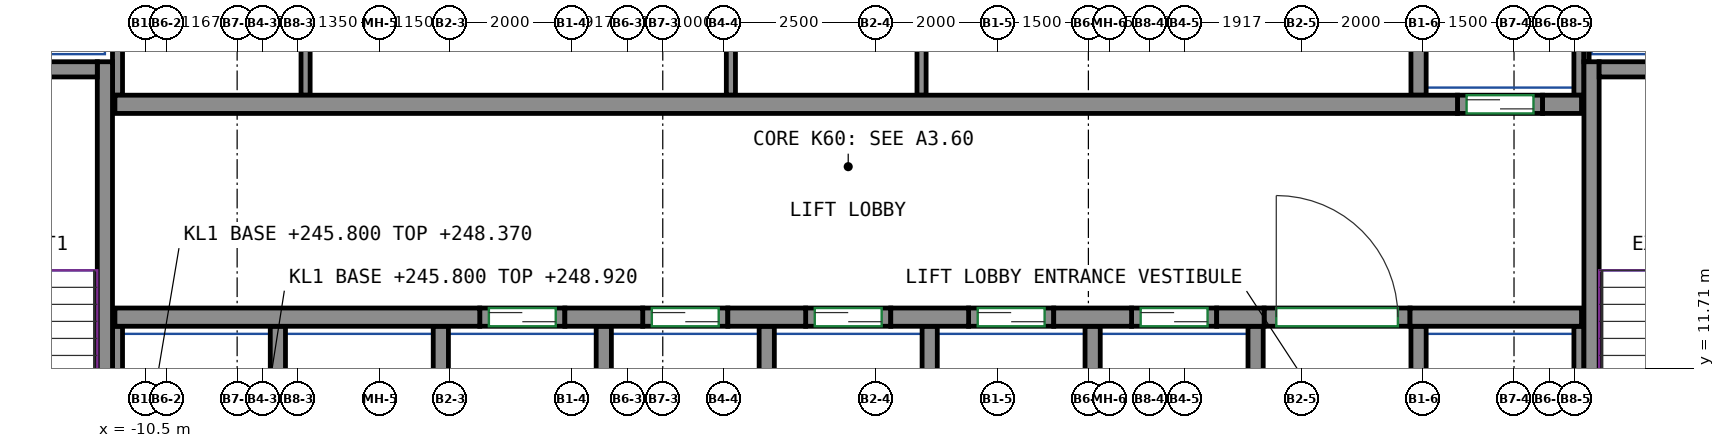
"""IFC4 building model, lengths in metres.
Left out: names, types, materials, properties, quantities, classifications, styles, units other than length and angle.
Written with IfcOpenShell. Run it as: python <this file> out.ifc"""

import sys

from ifc_helpers import new_model, si_unit, direction, frame, frame_2d, origin, place, context, subcontext, project, spatial, rectangle, extrude, source, transform, mapped, element, fill, save


model = new_model("IFC4")
c1 = context("Model", 3, precision=1e-05, world=origin(), true_north=direction((0.0, 1.0)))
c2 = subcontext(c1, "Body", "Model", "MODEL_VIEW")
j1 = project(units=[si_unit("LENGTHUNIT", "METRE"), si_unit("PLANEANGLEUNIT", "RADIAN")], contexts=[c1])
p1 = place(None, origin())
s1 = spatial("IfcSite", under=j1, at=p1, CompositionType="ELEMENT")
p2 = place(p1, origin())
s2 = spatial("IfcBuilding", under=s1, at=p2, CompositionType="ELEMENT")
p3 = place(p2, frame((0.0, 0.0, 245.8)))
s3 = spatial("IfcBuildingStorey", under=s2, at=p3, CompositionType="ELEMENT", Elevation=245.8)
m1 = source(origin(), c2, "Body", "SweptSolid", [
    extrude(rectangle(XDim=7.75, YDim=0.25, at=frame_2d((3.875, 0.0))), origin(), (0.0, 0.0, 1.0), 3.12),
])
p4 = place(p3, frame((-11.175, 9.0, 0.0), z_axis=(0.0, 0.0, 1.0), x_axis=(0.0, 1.0, 0.0)))
e1 = element("IfcWall", 1, at=p4, inside=s3, PredefinedType="SHEAR", context=c2, shape_type="MappedRepresentation", body=[
    mapped(m1, transform((0.0, 0.0, 0.0))),
])
m2 = source(origin(), c2, "Body", "SweptSolid", [
    extrude(rectangle(XDim=3.7, YDim=0.25, at=frame_2d((1.85, 0.0))), origin(), (0.0, 0.0, 1.0), 3.12),
])
p5 = place(p3, frame((-15.0, 16.625, 0.0), z_axis=(0.0, 0.0, 1.0), x_axis=(1.0, 0.0, 0.0)))
e2 = element("IfcWall", 2, at=p5, inside=s3, PredefinedType="SHEAR", context=c2, shape_type="MappedRepresentation", body=[
    mapped(m2, transform((0.0, 0.0, 0.0))),
])
p6 = place(p3, frame((13.275, 9.0, 0.0), z_axis=(0.0, 0.0, 1.0), x_axis=(0.0, 1.0, 0.0)))
e3 = element("IfcWall", 3, at=p6, inside=s3, PredefinedType="SHEAR", context=c2, shape_type="MappedRepresentation", body=[
    mapped(m1, transform((0.0, 0.0, 0.0))),
])
m3 = source(origin(), c2, "Body", "SweptSolid", [
    extrude(rectangle(XDim=3.7, YDim=0.25, at=frame_2d((1.85, 0.0))), origin(), (0.0, 0.0, 1.0), 3.12),
])
p7 = place(p3, frame((13.4, 16.625, 0.0), z_axis=(0.0, 0.0, 1.0), x_axis=(1.0, 0.0, 0.0)))
e4 = element("IfcWall", 4, at=p7, inside=s3, PredefinedType="SHEAR", context=c2, shape_type="MappedRepresentation", body=[
    mapped(m3, transform((0.0, 0.0, 0.0))),
])
m4 = source(origin(), c2, "Body", "SweptSolid", [
    extrude(rectangle(XDim=6.0, YDim=0.3, at=frame_2d((3.0, 0.0))), origin(), (0.0, 0.0, 1.0), 3.12),
])
p8 = place(p3, frame((-11.01, 12.55, 0.0), z_axis=(0.0, 0.0, 1.0), x_axis=(1.0, 0.0, 0.0)))
e5 = element("IfcWall", 5, at=p8, inside=s3, PredefinedType="SHEAR", context=c2, shape_type="MappedRepresentation", body=[
    mapped(m4, transform((0.0, 0.0, 0.0))),
])
m5 = source(origin(), c2, "Body", "SweptSolid", [
    extrude(rectangle(XDim=1.28, YDim=0.3, at=frame_2d((0.64, 0.0))), origin(), (0.0, 0.0, 1.0), 3.12),
])
for number, where, z_axis, x_axis in (
    (6, (-3.61, 12.55, 0.0), (0.0, 0.0, 1.0), (1.0, 0.0, 0.0)),
    (7, (-0.93, 12.55, 0.0), (0.0, 0.0, 1.0), (1.0, 0.0, 0.0)),
    (8, (1.75, 12.55, 0.0), (0.0, 0.0, 1.0), (1.0, 0.0, 0.0)),
    (9, (4.43, 12.55, 0.0), (0.0, 0.0, 1.0), (1.0, 0.0, 0.0)),
):
    element("IfcWall", number, at=place(p3, frame(where, z_axis=z_axis, x_axis=x_axis)), inside=s3, PredefinedType="SHEAR", context=c2, shape_type="MappedRepresentation", body=[
        mapped(m5, transform((0.0, 0.0, 0.0))),
    ])
m6 = source(origin(), c2, "Body", "SweptSolid", [
    extrude(rectangle(XDim=0.78, YDim=0.3, at=frame_2d((0.39, 0.0))), origin(), (0.0, 0.0, 1.0), 3.12),
])
p9 = place(p3, frame((7.11, 12.55, 0.0), z_axis=(0.0, 0.0, 1.0), x_axis=(1.0, 0.0, 0.0)))
e10 = element("IfcWall", 10, at=p9, inside=s3, PredefinedType="SHEAR", context=c2, shape_type="MappedRepresentation", body=[
    mapped(m6, transform((0.0, 0.0, 0.0))),
])
m7 = source(origin(), c2, "Body", "SweptSolid", [
    extrude(rectangle(XDim=2.82, YDim=0.3, at=frame_2d((1.41, 0.0))), origin(), (0.0, 0.0, 1.0), 3.12),
])
p10 = place(p3, frame((10.29, 12.55, 0.0), z_axis=(0.0, 0.0, 1.0), x_axis=(1.0, 0.0, 0.0)))
e11 = element("IfcWall", 11, at=p10, inside=s3, PredefinedType="SHEAR", context=c2, shape_type="MappedRepresentation", body=[
    mapped(m7, transform((0.0, 0.0, 0.0))),
])
m8 = source(origin(), c2, "Body", "SweptSolid", [
    extrude(rectangle(XDim=22.08, YDim=0.3, at=frame_2d((11.04, 0.0))), origin(), (0.0, 0.0, 1.0), 3.12),
])
p11 = place(p3, frame((-11.01, 16.05, 0.0), z_axis=(0.0, 0.0, 1.0), x_axis=(1.0, 0.0, 0.0)))
e12 = element("IfcWall", 12, at=p11, inside=s3, PredefinedType="SHEAR", context=c2, shape_type="MappedRepresentation", body=[
    mapped(m8, transform((0.0, 0.0, 0.0))),
])
m9 = source(origin(), c2, "Body", "SweptSolid", [
    extrude(rectangle(XDim=0.64, YDim=0.3, at=frame_2d((0.32, 0.0))), origin(), (0.0, 0.0, 1.0), 3.12),
])
p12 = place(p3, frame((12.47, 16.05, 0.0), z_axis=(0.0, 0.0, 1.0), x_axis=(1.0, 0.0, 0.0)))
e13 = element("IfcWall", 13, at=p12, inside=s3, PredefinedType="SHEAR", context=c2, shape_type="MappedRepresentation", body=[
    mapped(m9, transform((0.0, 0.0, 0.0))),
])
m10 = source(origin(), c2, "Body", "SweptSolid", [
    extrude(rectangle(XDim=1.4, YDim=0.3, at=frame_2d((0.7, 0.0))), origin(), (0.0, 0.0, 1.0), 3.12),
])
p13 = place(p3, frame((-5.01, 12.55, 0.0), z_axis=(0.0, 0.0, 1.0), x_axis=(1.0, 0.0, 0.0)))
e14 = element("IfcWall", 14, at=p13, inside=s3, PredefinedType="PARTITIONING", context=c2, shape_type="MappedRepresentation", body=[
    mapped(m10, transform((0.0, 0.0, 0.0))),
])
p14 = place(p13, frame((0.15, 0.0, 0.0)))
e15 = element("IfcOpeningElement", 15, at=p14, cuts=e14, PredefinedType="OPENING", context=c2, shape_type="SweptSolid", body=[
    extrude(rectangle(XDim=1.1, YDim=2.1, at=frame_2d((0.55, 1.05))), frame((0.0, 0.16, 0.0), z_axis=(0.0, -1.0, 0.0), x_axis=(1.0, 0.0, 0.0)), (0.0, 0.0, 1.0), 0.32),
])
m11 = source(origin(), c2, "Body", "SweptSolid", [
    extrude(rectangle(XDim=1.4, YDim=0.3, at=frame_2d((0.7, 0.0))), origin(), (0.0, 0.0, 1.0), 3.12),
])
p15 = place(p3, frame((-2.33, 12.55, 0.0), z_axis=(0.0, 0.0, 1.0), x_axis=(1.0, 0.0, 0.0)))
e16 = element("IfcWall", 16, at=p15, inside=s3, PredefinedType="PARTITIONING", context=c2, shape_type="MappedRepresentation", body=[
    mapped(m11, transform((0.0, 0.0, 0.0))),
])
p16 = place(p15, frame((0.15, 0.0, 0.0)))
e17 = element("IfcOpeningElement", 17, at=p16, cuts=e16, PredefinedType="OPENING", context=c2, shape_type="SweptSolid", body=[
    extrude(rectangle(XDim=1.1, YDim=2.1, at=frame_2d((0.55, 1.05))), frame((0.0, 0.16, 0.0), z_axis=(0.0, -1.0, 0.0), x_axis=(1.0, 0.0, 0.0)), (0.0, 0.0, 1.0), 0.32),
])
p17 = place(p3, frame((0.35, 12.55, 0.0), z_axis=(0.0, 0.0, 1.0), x_axis=(1.0, 0.0, 0.0)))
e18 = element("IfcWall", 18, at=p17, inside=s3, PredefinedType="PARTITIONING", context=c2, shape_type="MappedRepresentation", body=[
    mapped(m10, transform((0.0, 0.0, 0.0))),
])
p18 = place(p17, frame((0.15, 0.0, 0.0)))
e19 = element("IfcOpeningElement", 19, at=p18, cuts=e18, PredefinedType="OPENING", context=c2, shape_type="SweptSolid", body=[
    extrude(rectangle(XDim=1.1, YDim=2.1, at=frame_2d((0.55, 1.05))), frame((0.0, 0.16, 0.0), z_axis=(0.0, -1.0, 0.0), x_axis=(1.0, 0.0, 0.0)), (0.0, 0.0, 1.0), 0.32),
])
p19 = place(p3, frame((3.03, 12.55, 0.0), z_axis=(0.0, 0.0, 1.0), x_axis=(1.0, 0.0, 0.0)))
e20 = element("IfcWall", 20, at=p19, inside=s3, PredefinedType="PARTITIONING", context=c2, shape_type="MappedRepresentation", body=[
    mapped(m10, transform((0.0, 0.0, 0.0))),
])
p20 = place(p19, frame((0.15, 0.0, 0.0)))
e21 = element("IfcOpeningElement", 21, at=p20, cuts=e20, PredefinedType="OPENING", context=c2, shape_type="SweptSolid", body=[
    extrude(rectangle(XDim=1.1, YDim=2.1, at=frame_2d((0.55, 1.05))), frame((0.0, 0.16, 0.0), z_axis=(0.0, -1.0, 0.0), x_axis=(1.0, 0.0, 0.0)), (0.0, 0.0, 1.0), 0.32),
])
p21 = place(p3, frame((5.71, 12.55, 0.0), z_axis=(0.0, 0.0, 1.0), x_axis=(1.0, 0.0, 0.0)))
e22 = element("IfcWall", 22, at=p21, inside=s3, PredefinedType="PARTITIONING", context=c2, shape_type="MappedRepresentation", body=[
    mapped(m11, transform((0.0, 0.0, 0.0))),
])
p22 = place(p21, frame((0.15, 0.0, 0.0)))
e23 = element("IfcOpeningElement", 23, at=p22, cuts=e22, PredefinedType="OPENING", context=c2, shape_type="SweptSolid", body=[
    extrude(rectangle(XDim=1.1, YDim=2.1, at=frame_2d((0.55, 1.05))), frame((0.0, 0.16, 0.0), z_axis=(0.0, -1.0, 0.0), x_axis=(1.0, 0.0, 0.0)), (0.0, 0.0, 1.0), 0.32),
])
p23 = place(p3, frame((11.07, 16.05, 0.0), z_axis=(0.0, 0.0, 1.0), x_axis=(1.0, 0.0, 0.0)))
e24 = element("IfcWall", 24, at=p23, inside=s3, PredefinedType="PARTITIONING", context=c2, shape_type="MappedRepresentation", body=[
    mapped(m10, transform((0.0, 0.0, 0.0))),
])
p24 = place(p23, frame((0.15, 0.0, 0.0)))
e25 = element("IfcOpeningElement", 25, at=p24, cuts=e24, PredefinedType="OPENING", context=c2, shape_type="SweptSolid", body=[
    extrude(rectangle(XDim=1.1, YDim=2.1, at=frame_2d((0.55, 1.05))), frame((0.0, 0.16, 0.0), z_axis=(0.0, -1.0, 0.0), x_axis=(1.0, 0.0, 0.0)), (0.0, 0.0, 1.0), 0.32),
])
m12 = source(origin(), c2, "Body", "SweptSolid", [
    extrude(rectangle(XDim=2.4, YDim=0.3, at=frame_2d((1.2, 0.0))), origin(), (0.0, 0.0, 1.0), 3.12),
])
p25 = place(p3, frame((7.89, 12.55, 0.0), z_axis=(0.0, 0.0, 1.0), x_axis=(1.0, 0.0, 0.0)))
e26 = element("IfcWall", 26, at=p25, inside=s3, PredefinedType="PARTITIONING", context=c2, shape_type="MappedRepresentation", body=[
    mapped(m12, transform((0.0, 0.0, 0.0))),
])
p26 = place(p25, frame((0.2, 0.0, 0.0)))
e27 = element("IfcOpeningElement", 27, at=p26, cuts=e26, PredefinedType="OPENING", context=c2, shape_type="SweptSolid", body=[
    extrude(rectangle(XDim=2.0, YDim=2.1, at=frame_2d((1.0, 1.05))), frame((0.0, 0.16, 0.0), z_axis=(0.0, -1.0, 0.0), x_axis=(1.0, 0.0, 0.0)), (0.0, 0.0, 1.0), 0.32),
])
m13 = source(origin(), c2, "Body", "SweptSolid", [
    extrude(rectangle(XDim=3.275, YDim=0.165, at=frame_2d((1.638, 0.0))), origin(), (0.0, 0.0, 1.0), 3.12),
])
p27 = place(p3, frame((13.067, 16.2, 0.0), z_axis=(0.0, 0.0, 1.0), x_axis=(0.0, 1.0, 0.0)))
e28 = element("IfcWall", 28, at=p27, inside=s3, PredefinedType="PARTITIONING", context=c2, shape_type="MappedRepresentation", body=[
    mapped(m13, transform((0.0, 0.0, 0.0))),
])
m14 = source(origin(), c2, "Body", "SweptSolid", [
    extrude(rectangle(XDim=4.8, YDim=0.165, at=frame_2d((2.4, 0.0))), origin(), (0.0, 0.0, 1.0), 3.12),
])
p28 = place(p3, frame((-10.968, 16.2, 0.0), z_axis=(0.0, 0.0, 1.0), x_axis=(0.0, 1.0, 0.0)))
e29 = element("IfcWall", 29, at=p28, inside=s3, PredefinedType="PARTITIONING", context=c2, shape_type="MappedRepresentation", body=[
    mapped(m14, transform((0.0, 0.0, 0.0))),
])
m15 = source(origin(), c2, "Body", "SweptSolid", [
    extrude(rectangle(XDim=3.275, YDim=0.25, at=frame_2d((1.638, 0.0))), origin(), (0.0, 0.0, 1.0), 3.12),
])
p29 = place(p3, frame((10.43, 16.2, 0.0), z_axis=(0.0, 0.0, 1.0), x_axis=(0.0, 1.0, 0.0)))
e30 = element("IfcWall", 30, at=p29, inside=s3, PredefinedType="PARTITIONING", context=c2, shape_type="MappedRepresentation", body=[
    mapped(m15, transform((0.0, 0.0, 0.0))),
])
m16 = source(origin(), c2, "Body", "SweptSolid", [
    extrude(rectangle(XDim=2.725, YDim=0.085, at=frame_2d((1.363, 0.0))), origin(), (0.0, 0.0, 1.0), 3.12),
])
p30 = place(p3, frame((13.192, 16.75, 0.0), z_axis=(0.0, 0.0, 1.0), x_axis=(0.0, 1.0, 0.0)))
e31 = element("IfcWall", 31, at=p30, inside=s3, PredefinedType="PARTITIONING", context=c2, shape_type="MappedRepresentation", body=[
    mapped(m16, transform((0.0, 0.0, 0.0))),
])
m17 = source(origin(), c2, "Body", "SweptSolid", [
    extrude(rectangle(XDim=3.4, YDim=0.25, at=frame_2d((1.7, 0.0))), origin(), (0.0, 0.0, 1.0), 3.12),
])
p31 = place(p3, frame((10.43, 9.0, 0.0), z_axis=(0.0, 0.0, 1.0), x_axis=(0.0, 1.0, 0.0)))
e32 = element("IfcWall", 32, at=p31, inside=s3, PredefinedType="PARTITIONING", context=c2, shape_type="MappedRepresentation", body=[
    mapped(m17, transform((0.0, 0.0, 0.0))),
])
m18 = source(origin(), c2, "Body", "SweptSolid", [
    extrude(rectangle(XDim=3.4, YDim=0.165, at=frame_2d((1.7, 0.0))), origin(), (0.0, 0.0, 1.0), 3.12),
])
p32 = place(p3, frame((13.067, 9.0, 0.0), z_axis=(0.0, 0.0, 1.0), x_axis=(0.0, 1.0, 0.0)))
e33 = element("IfcWall", 33, at=p32, inside=s3, PredefinedType="PARTITIONING", context=c2, shape_type="MappedRepresentation", body=[
    mapped(m18, transform((0.0, 0.0, 0.0))),
])
for number, where, z_axis, x_axis in (
    (34, (2.39, 9.0, 0.0), (0.0, 0.0, 1.0), (0.0, 1.0, 0.0)),
    (35, (5.07, 9.0, 0.0), (0.0, 0.0, 1.0), (0.0, 1.0, 0.0)),
    (36, (7.75, 9.0, 0.0), (0.0, 0.0, 1.0), (0.0, 1.0, 0.0)),
    (37, (-0.29, 9.0, 0.0), (0.0, 0.0, 1.0), (0.0, 1.0, 0.0)),
):
    element("IfcWall", number, at=place(p3, frame(where, z_axis=z_axis, x_axis=x_axis)), inside=s3, PredefinedType="PARTITIONING", context=c2, shape_type="MappedRepresentation", body=[
        mapped(m17, transform((0.0, 0.0, 0.0))),
    ])
p33 = place(p3, frame((-10.968, 9.0, 0.0), z_axis=(0.0, 0.0, 1.0), x_axis=(0.0, 1.0, 0.0)))
e38 = element("IfcWall", 38, at=p33, inside=s3, PredefinedType="PARTITIONING", context=c2, shape_type="MappedRepresentation", body=[
    mapped(m18, transform((0.0, 0.0, 0.0))),
])
for number, where, z_axis, x_axis in (
    (39, (-2.97, 9.0, 0.0), (0.0, 0.0, 1.0), (0.0, 1.0, 0.0)),
    (40, (-5.65, 9.0, 0.0), (0.0, 0.0, 1.0), (0.0, 1.0, 0.0)),
    (41, (-8.33, 9.0, 0.0), (0.0, 0.0, 1.0), (0.0, 1.0, 0.0)),
):
    element("IfcWall", number, at=place(p3, frame(where, z_axis=z_axis, x_axis=x_axis)), inside=s3, PredefinedType="PARTITIONING", context=c2, shape_type="MappedRepresentation", body=[
        mapped(m17, transform((0.0, 0.0, 0.0))),
    ])
m19 = source(origin(), c2, "Body", "SweptSolid", [
    extrude(rectangle(XDim=4.8, YDim=0.15, at=frame_2d((2.4, 0.0))), origin(), (0.0, 0.0, 1.0), 3.12),
])
for number, where, z_axis, x_axis in (
    (42, (-7.875, 16.2, 0.0), (0.0, 0.0, 1.0), (0.0, 1.0, 0.0)),
    (43, (-0.88, 16.2, 0.0), (0.0, 0.0, 1.0), (0.0, 1.0, 0.0)),
    (44, (2.256, 16.2, 0.0), (0.0, 0.0, 1.0), (0.0, 1.0, 0.0)),
):
    element("IfcWall", number, at=place(p3, frame(where, z_axis=z_axis, x_axis=x_axis)), inside=s3, PredefinedType="PARTITIONING", context=c2, shape_type="MappedRepresentation", body=[
        mapped(m19, transform((0.0, 0.0, 0.0))),
    ])
p34 = place(p26, origin())
e45 = element("IfcDoor", 45, at=p34, inside=s3, OperationType="DOUBLE_DOOR_SINGLE_SWING", PredefinedType="DOOR", context=c2, shape_type="SweptSolid", body=[
    extrude(rectangle(XDim=2.0, YDim=2.1, at=frame_2d((1.0, 1.05))), frame((0.0, 0.025, 0.0), z_axis=(0.0, -1.0, 0.0), x_axis=(1.0, 0.0, 0.0)), (0.0, 0.0, 1.0), 0.05),
])
fill(e27, e45)
p35 = place(p14, origin())
e46 = element("IfcDoor", 46, at=p35, inside=s3, OperationType="DOUBLE_DOOR_SLIDING", PredefinedType="DOOR", context=c2, shape_type="SweptSolid", body=[
    extrude(rectangle(XDim=1.1, YDim=2.1, at=frame_2d((0.55, 1.05))), frame((0.0, 0.025, 0.0), z_axis=(0.0, -1.0, 0.0), x_axis=(1.0, 0.0, 0.0)), (0.0, 0.0, 1.0), 0.05),
])
fill(e15, e46)
p36 = place(p16, origin())
e47 = element("IfcDoor", 47, at=p36, inside=s3, OperationType="DOUBLE_DOOR_SLIDING", PredefinedType="DOOR", context=c2, shape_type="SweptSolid", body=[
    extrude(rectangle(XDim=1.1, YDim=2.1, at=frame_2d((0.55, 1.05))), frame((0.0, 0.025, 0.0), z_axis=(0.0, -1.0, 0.0), x_axis=(1.0, 0.0, 0.0)), (0.0, 0.0, 1.0), 0.05),
])
fill(e17, e47)
p37 = place(p18, origin())
e48 = element("IfcDoor", 48, at=p37, inside=s3, OperationType="DOUBLE_DOOR_SLIDING", PredefinedType="DOOR", context=c2, shape_type="SweptSolid", body=[
    extrude(rectangle(XDim=1.1, YDim=2.1, at=frame_2d((0.55, 1.05))), frame((0.0, 0.025, 0.0), z_axis=(0.0, -1.0, 0.0), x_axis=(1.0, 0.0, 0.0)), (0.0, 0.0, 1.0), 0.05),
])
fill(e19, e48)
p38 = place(p20, origin())
e49 = element("IfcDoor", 49, at=p38, inside=s3, OperationType="DOUBLE_DOOR_SLIDING", PredefinedType="DOOR", context=c2, shape_type="SweptSolid", body=[
    extrude(rectangle(XDim=1.1, YDim=2.1, at=frame_2d((0.55, 1.05))), frame((0.0, 0.025, 0.0), z_axis=(0.0, -1.0, 0.0), x_axis=(1.0, 0.0, 0.0)), (0.0, 0.0, 1.0), 0.05),
])
fill(e21, e49)
p39 = place(p22, origin())
e50 = element("IfcDoor", 50, at=p39, inside=s3, OperationType="DOUBLE_DOOR_SLIDING", PredefinedType="DOOR", context=c2, shape_type="SweptSolid", body=[
    extrude(rectangle(XDim=1.1, YDim=2.1, at=frame_2d((0.55, 1.05))), frame((0.0, 0.025, 0.0), z_axis=(0.0, -1.0, 0.0), x_axis=(1.0, 0.0, 0.0)), (0.0, 0.0, 1.0), 0.05),
])
fill(e23, e50)
p40 = place(p24, origin())
e51 = element("IfcDoor", 51, at=p40, inside=s3, OperationType="DOUBLE_DOOR_SLIDING", PredefinedType="DOOR", context=c2, shape_type="SweptSolid", body=[
    extrude(rectangle(XDim=1.1, YDim=2.1, at=frame_2d((0.55, 1.05))), frame((0.0, 0.025, 0.0), z_axis=(0.0, -1.0, 0.0), x_axis=(1.0, 0.0, 0.0)), (0.0, 0.0, 1.0), 0.05),
])
fill(e25, e51)
save(model, sys.argv[1])
